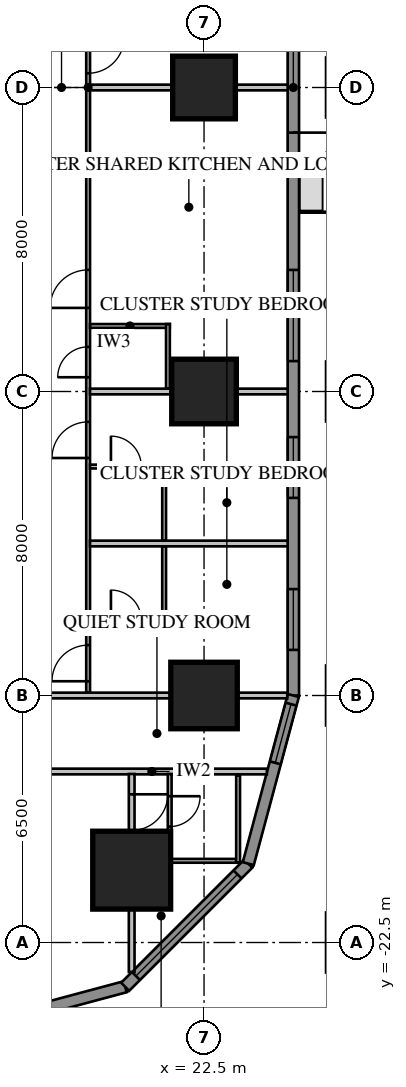
"""IFC4 building model, lengths in metres.
Left out: names, types, materials, properties, quantities, classifications, styles, units other than length and angle.
Written with IfcOpenShell. Run it as: python <this file> out.ifc"""

import sys

from ifc_helpers import new_model, si_unit, direction, frame, frame_2d, origin, origin_2d, place, context, subcontext, project, spatial, rectangle, extrude, element, fill, save


model = new_model("IFC4")
c1 = context("Model", 3, precision=1e-05, world=origin(), true_north=direction((0.0, 1.0)))
c2 = subcontext(c1, "Body", "Model", "MODEL_VIEW")
j1 = project(units=[si_unit("LENGTHUNIT", "METRE"), si_unit("PLANEANGLEUNIT", "RADIAN")], contexts=[c1])
p1 = place(None, origin())
s1 = spatial("IfcSite", under=j1, at=p1, CompositionType="ELEMENT")
p2 = place(p1, origin())
s2 = spatial("IfcBuilding", under=s1, at=p2, CompositionType="ELEMENT")
p3 = place(p2, frame((0.0, 0.0, 39.1)))
s3 = spatial("IfcBuildingStorey", under=s2, at=p3, CompositionType="ELEMENT", Elevation=39.1)
p4 = place(p3, frame((22.5, -16.0, 0.0), z_axis=(0.0, 0.0, 1.0), x_axis=(1.0, 0.0, 0.0)))
e1 = element("IfcColumn", 1, at=p4, inside=s3, PredefinedType="COLUMN", context=c2, shape_type="SweptSolid", body=[
    extrude(rectangle(XDim=1.75, YDim=1.75, at=origin_2d()), origin(), (0.0, 0.0, 1.0), 3.85),
])
p5 = place(p3, frame((22.5, -8.0, 0.0), z_axis=(0.0, 0.0, 1.0), x_axis=(1.0, 0.0, 0.0)))
e2 = element("IfcColumn", 2, at=p5, inside=s3, PredefinedType="COLUMN", context=c2, shape_type="SweptSolid", body=[
    extrude(rectangle(XDim=1.7, YDim=1.7, at=origin_2d()), origin(), (0.0, 0.0, 1.0), 3.85),
])
p6 = place(p3, frame((22.5, 0.0, 0.0), z_axis=(0.0, 0.0, 1.0), x_axis=(1.0, 0.0, 0.0)))
e3 = element("IfcColumn", 3, at=p6, inside=s3, PredefinedType="COLUMN", context=c2, shape_type="SweptSolid", body=[
    extrude(rectangle(XDim=1.65, YDim=1.65, at=origin_2d()), origin(), (0.0, 0.0, 1.0), 3.85),
])
p7 = place(p3, frame((20.596, -20.596, 0.0), z_axis=(0.0, 0.0, 1.0), x_axis=(1.0, 0.0, 0.0)))
e4 = element("IfcColumn", 4, at=p7, inside=s3, PredefinedType="COLUMN", context=c2, shape_type="SweptSolid", body=[
    extrude(rectangle(XDim=2.05, YDim=2.05, at=origin_2d()), origin(), (0.0, 0.0, 1.0), 3.85),
])
p8 = place(p3, frame((24.85, -16.0, 0.0), z_axis=(0.0, 0.0, 1.0), x_axis=(0.0, 1.0, 0.0)))
e5 = element("IfcWall", 5, at=p8, inside=s3, PredefinedType="SOLIDWALL", context=c2, shape_type="SweptSolid", body=[
    extrude(rectangle(XDim=32.0, YDim=0.3, at=frame_2d((16.0, 0.0))), origin(), (0.0, 0.0, 1.0), 3.65),
])
p9 = place(p8, frame((1.2, 0.0, 0.75)))
e6 = element("IfcOpeningElement", 6, at=p9, cuts=e5, PredefinedType="OPENING", context=c2, shape_type="SweptSolid", body=[
    extrude(rectangle(XDim=1.6, YDim=1.8, at=frame_2d((0.8, 0.9))), frame((0.0, 0.17, 0.0), z_axis=(0.0, -1.0, 0.0), x_axis=(1.0, 0.0, 0.0)), (0.0, 0.0, 1.0), 0.34),
])
p10 = place(p8, frame((5.2, 0.0, 0.75)))
e7 = element("IfcOpeningElement", 7, at=p10, cuts=e5, PredefinedType="OPENING", context=c2, shape_type="SweptSolid", body=[
    extrude(rectangle(XDim=1.6, YDim=1.8, at=frame_2d((0.8, 0.9))), frame((0.0, 0.17, 0.0), z_axis=(0.0, -1.0, 0.0), x_axis=(1.0, 0.0, 0.0)), (0.0, 0.0, 1.0), 0.34),
])
p11 = place(p8, frame((17.2, 0.0, 0.75)))
e8 = element("IfcOpeningElement", 8, at=p11, cuts=e5, PredefinedType="OPENING", context=c2, shape_type="SweptSolid", body=[
    extrude(rectangle(XDim=1.6, YDim=1.8, at=frame_2d((0.8, 0.9))), frame((0.0, 0.17, 0.0), z_axis=(0.0, -1.0, 0.0), x_axis=(1.0, 0.0, 0.0)), (0.0, 0.0, 1.0), 0.34),
])
p12 = place(p8, frame((21.2, 0.0, 0.75)))
e9 = element("IfcOpeningElement", 9, at=p12, cuts=e5, PredefinedType="OPENING", context=c2, shape_type="SweptSolid", body=[
    extrude(rectangle(XDim=1.6, YDim=1.8, at=frame_2d((0.8, 0.9))), frame((0.0, 0.17, 0.0), z_axis=(0.0, -1.0, 0.0), x_axis=(1.0, 0.0, 0.0)), (0.0, 0.0, 1.0), 0.34),
])
p13 = place(p8, frame((25.2, 0.0, 0.75)))
e10 = element("IfcOpeningElement", 10, at=p13, cuts=e5, PredefinedType="OPENING", context=c2, shape_type="SweptSolid", body=[
    extrude(rectangle(XDim=1.6, YDim=1.8, at=frame_2d((0.8, 0.9))), frame((0.0, 0.17, 0.0), z_axis=(0.0, -1.0, 0.0), x_axis=(1.0, 0.0, 0.0)), (0.0, 0.0, 1.0), 0.34),
])
p14 = place(p8, frame((29.2, 0.0, 0.75)))
e11 = element("IfcOpeningElement", 11, at=p14, cuts=e5, PredefinedType="OPENING", context=c2, shape_type="SweptSolid", body=[
    extrude(rectangle(XDim=1.6, YDim=1.8, at=frame_2d((0.8, 0.9))), frame((0.0, 0.17, 0.0), z_axis=(0.0, -1.0, 0.0), x_axis=(1.0, 0.0, 0.0)), (0.0, 0.0, 1.0), 0.34),
])
p15 = place(p8, frame((8.8, 0.0, 0.75)))
e12 = element("IfcOpeningElement", 12, at=p15, cuts=e5, PredefinedType="OPENING", context=c2, shape_type="SweptSolid", body=[
    extrude(rectangle(XDim=2.4, YDim=1.8, at=frame_2d((1.2, 0.9))), frame((0.0, 0.17, 0.0), z_axis=(0.0, -1.0, 0.0), x_axis=(1.0, 0.0, 0.0)), (0.0, 0.0, 1.0), 0.34),
])
p16 = place(p8, frame((13.812, 0.0, 0.0)))
e13 = element("IfcOpeningElement", 13, at=p16, cuts=e5, PredefinedType="OPENING", context=c2, shape_type="SweptSolid", body=[
    extrude(rectangle(XDim=1.0, YDim=2.4, at=frame_2d((0.5, 1.2))), frame((0.0, 0.17, 0.0), z_axis=(0.0, -1.0, 0.0), x_axis=(1.0, 0.0, 0.0)), (0.0, 0.0, 1.0), 0.34),
])
p17 = place(p3, frame((16.0, -24.85, 0.0), z_axis=(0.0, 0.0, 1.0), x_axis=(0.965920218567, 0.258839972501, 0.0)))
e14 = element("IfcWall", 14, at=p17, inside=s3, PredefinedType="SOLIDWALL", context=c2, shape_type="SweptSolid", body=[
    extrude(rectangle(XDim=4.581, YDim=0.3, at=frame_2d((2.291, 0.0))), origin(), (0.0, 0.0, 1.0), 3.65),
])
p18 = place(p3, frame((20.425, -23.664, 0.0), z_axis=(0.0, 0.0, 1.0), x_axis=(0.707106781187, 0.707106781187, 0.0)))
e15 = element("IfcWall", 15, at=p18, inside=s3, PredefinedType="SOLIDWALL", context=c2, shape_type="SweptSolid", body=[
    extrude(rectangle(XDim=4.581, YDim=0.3, at=frame_2d((2.291, 0.0))), origin(), (0.0, 0.0, 1.0), 3.65),
])
p19 = place(p18, frame((0.4, 0.0, 0.75)))
e16 = element("IfcOpeningElement", 16, at=p19, cuts=e15, PredefinedType="OPENING", context=c2, shape_type="SweptSolid", body=[
    extrude(rectangle(XDim=3.781, YDim=1.8, at=frame_2d((1.891, 0.9))), frame((0.0, 0.17, 0.0), z_axis=(0.0, -1.0, 0.0), x_axis=(1.0, 0.0, 0.0)), (0.0, 0.0, 1.0), 0.34),
])
p20 = place(p3, frame((23.664, -20.425, 0.0), z_axis=(0.0, 0.0, 1.0), x_axis=(0.258839972501, 0.965920218567, 0.0)))
e17 = element("IfcWall", 17, at=p20, inside=s3, PredefinedType="SOLIDWALL", context=c2, shape_type="SweptSolid", body=[
    extrude(rectangle(XDim=4.581, YDim=0.3, at=frame_2d((2.291, 0.0))), origin(), (0.0, 0.0, 1.0), 3.65),
])
p21 = place(p20, frame((2.746, 0.0, 0.75)))
e18 = element("IfcOpeningElement", 18, at=p21, cuts=e17, PredefinedType="OPENING", context=c2, shape_type="SweptSolid", body=[
    extrude(rectangle(XDim=1.6, YDim=1.8, at=frame_2d((0.8, 0.9))), frame((0.0, 0.17, 0.0), z_axis=(0.0, -1.0, 0.0), x_axis=(1.0, 0.0, 0.0)), (0.0, 0.0, 1.0), 0.34),
])
p22 = place(p3, frame((19.45, -15.925, 0.0), z_axis=(0.0, 0.0, 1.0), x_axis=(0.0, 1.0, 0.0)))
e19 = element("IfcWall", 19, at=p22, inside=s3, PredefinedType="PARTITIONING", context=c2, shape_type="SweptSolid", body=[
    extrude(rectangle(XDim=31.85, YDim=0.1, at=frame_2d((15.925, 0.0))), origin(), (0.0, 0.0, 1.0), 3.65),
])
p23 = place(p22, frame((10.125, 0.0, 0.0)))
e20 = element("IfcOpeningElement", 20, at=p23, cuts=e19, PredefinedType="OPENING", context=c2, shape_type="SweptSolid", body=[
    extrude(rectangle(XDim=1.0, YDim=2.1, at=frame_2d((0.5, 1.05))), frame((0.0, 0.07, 0.0), z_axis=(0.0, -1.0, 0.0), x_axis=(1.0, 0.0, 0.0)), (0.0, 0.0, 1.0), 0.14),
])
p24 = place(p22, frame((8.3, 0.0, 0.0)))
e21 = element("IfcOpeningElement", 21, at=p24, cuts=e19, PredefinedType="OPENING", context=c2, shape_type="SweptSolid", body=[
    extrude(rectangle(XDim=0.8, YDim=2.1, at=frame_2d((0.4, 1.05))), frame((0.0, 0.07, 0.0), z_axis=(0.0, -1.0, 0.0), x_axis=(1.0, 0.0, 0.0)), (0.0, 0.0, 1.0), 0.14),
])
p25 = place(p22, frame((0.3, 0.0, 0.0)))
e22 = element("IfcOpeningElement", 22, at=p25, cuts=e19, PredefinedType="OPENING", context=c2, shape_type="SweptSolid", body=[
    extrude(rectangle(XDim=0.95, YDim=2.1, at=frame_2d((0.475, 1.05))), frame((0.0, 0.07, 0.0), z_axis=(0.0, -1.0, 0.0), x_axis=(1.0, 0.0, 0.0)), (0.0, 0.0, 1.0), 0.14),
])
p26 = place(p22, frame((6.175, 0.0, 0.0)))
e23 = element("IfcOpeningElement", 23, at=p26, cuts=e19, PredefinedType="OPENING", context=c2, shape_type="SweptSolid", body=[
    extrude(rectangle(XDim=0.95, YDim=2.1, at=frame_2d((0.475, 1.05))), frame((0.0, 0.07, 0.0), z_axis=(0.0, -1.0, 0.0), x_axis=(1.0, 0.0, 0.0)), (0.0, 0.0, 1.0), 0.14),
])
p27 = place(p22, frame((16.3, 0.0, 0.0)))
e24 = element("IfcOpeningElement", 24, at=p27, cuts=e19, PredefinedType="OPENING", context=c2, shape_type="SweptSolid", body=[
    extrude(rectangle(XDim=0.95, YDim=2.1, at=frame_2d((0.475, 1.05))), frame((0.0, 0.07, 0.0), z_axis=(0.0, -1.0, 0.0), x_axis=(1.0, 0.0, 0.0)), (0.0, 0.0, 1.0), 0.14),
])
p28 = place(p22, frame((22.175, 0.0, 0.0)))
e25 = element("IfcOpeningElement", 25, at=p28, cuts=e19, PredefinedType="OPENING", context=c2, shape_type="SweptSolid", body=[
    extrude(rectangle(XDim=0.95, YDim=2.1, at=frame_2d((0.475, 1.05))), frame((0.0, 0.07, 0.0), z_axis=(0.0, -1.0, 0.0), x_axis=(1.0, 0.0, 0.0)), (0.0, 0.0, 1.0), 0.14),
])
p29 = place(p22, frame((24.3, 0.0, 0.0)))
e26 = element("IfcOpeningElement", 26, at=p29, cuts=e19, PredefinedType="OPENING", context=c2, shape_type="SweptSolid", body=[
    extrude(rectangle(XDim=0.95, YDim=2.1, at=frame_2d((0.475, 1.05))), frame((0.0, 0.07, 0.0), z_axis=(0.0, -1.0, 0.0), x_axis=(1.0, 0.0, 0.0)), (0.0, 0.0, 1.0), 0.14),
])
p30 = place(p22, frame((30.175, 0.0, 0.0)))
e27 = element("IfcOpeningElement", 27, at=p30, cuts=e19, PredefinedType="OPENING", context=c2, shape_type="SweptSolid", body=[
    extrude(rectangle(XDim=0.95, YDim=2.1, at=frame_2d((0.475, 1.05))), frame((0.0, 0.07, 0.0), z_axis=(0.0, -1.0, 0.0), x_axis=(1.0, 0.0, 0.0)), (0.0, 0.0, 1.0), 0.14),
])
p31 = place(p3, frame((19.5, -6.275, 0.0), z_axis=(0.0, 0.0, 1.0), x_axis=(1.0, 0.0, 0.0)))
e28 = element("IfcWall", 28, at=p31, inside=s3, PredefinedType="PARTITIONING", context=c2, shape_type="SweptSolid", body=[
    extrude(rectangle(XDim=2.1, YDim=0.1, at=frame_2d((1.05, 0.0))), origin(), (0.0, 0.0, 1.0), 3.65),
])
p32 = place(p3, frame((21.55, -7.925, 0.0), z_axis=(0.0, 0.0, 1.0), x_axis=(0.0, 1.0, 0.0)))
e29 = element("IfcWall", 29, at=p32, inside=s3, PredefinedType="PARTITIONING", context=c2, shape_type="SweptSolid", body=[
    extrude(rectangle(XDim=1.7, YDim=0.1, at=frame_2d((0.85, 0.0))), origin(), (0.0, 0.0, 1.0), 3.65),
])
p33 = place(p3, frame((18.1, -18.0, 0.0), z_axis=(0.0, 0.0, 1.0), x_axis=(1.0, 0.0, 0.0)))
e30 = element("IfcWall", 30, at=p33, inside=s3, PredefinedType="PARTITIONING", context=c2, shape_type="SweptSolid", body=[
    extrude(rectangle(XDim=6.053, YDim=0.15, at=frame_2d((3.027, 0.0))), origin(), (0.0, 0.0, 1.0), 3.65),
])
p34 = place(p3, frame((18.1, -16.0, 0.0), z_axis=(0.0, 0.0, 1.0), x_axis=(1.0, 0.0, 0.0)))
e31 = element("IfcWall", 31, at=p34, inside=s3, PredefinedType="PARTITIONING", context=c2, shape_type="SweptSolid", body=[
    extrude(rectangle(XDim=6.589, YDim=0.15, at=frame_2d((3.295, 0.0))), origin(), (0.0, 0.0, 1.0), 3.65),
])
for number, where, z_axis, x_axis in (
    (32, (19.5, -12.0, 0.0), (0.0, 0.0, 1.0), (1.0, 0.0, 0.0)),
    (33, (19.5, -8.0, 0.0), (0.0, 0.0, 1.0), (1.0, 0.0, 0.0)),
):
    element("IfcWall", number, at=place(p3, frame(where, z_axis=z_axis, x_axis=x_axis)), inside=s3, PredefinedType="PARTITIONING", context=c2, shape_type="SweptSolid", body=[
        extrude(rectangle(XDim=5.2, YDim=0.15, at=frame_2d((2.6, 0.0))), origin(), (0.0, 0.0, 1.0), 3.65),
    ])
p35 = place(p3, frame((19.5, 0.0, 0.0), z_axis=(0.0, 0.0, 1.0), x_axis=(1.0, 0.0, 0.0)))
e34 = element("IfcWall", 34, at=p35, inside=s3, PredefinedType="PARTITIONING", context=c2, shape_type="SweptSolid", body=[
    extrude(rectangle(XDim=5.2, YDim=0.15, at=frame_2d((2.6, 0.0))), origin(), (0.0, 0.0, 1.0), 2.957),
])
p36 = place(p3, frame((19.5, -14.025, 0.0), z_axis=(0.0, 0.0, 1.0), x_axis=(1.0, 0.0, 0.0)))
e35 = element("IfcWall", 35, at=p36, inside=s3, PredefinedType="PARTITIONING", context=c2, shape_type="SweptSolid", body=[
    extrude(rectangle(XDim=2.0, YDim=0.1, at=frame_2d((1.0, 0.0))), origin(), (0.0, 0.0, 1.0), 3.65),
])
p37 = place(p36, frame((0.55, 0.0, 0.0)))
e36 = element("IfcOpeningElement", 36, at=p37, cuts=e35, PredefinedType="OPENING", context=c2, shape_type="SweptSolid", body=[
    extrude(rectangle(XDim=0.8, YDim=2.1, at=frame_2d((0.4, 1.05))), frame((0.0, 0.07, 0.0), z_axis=(0.0, -1.0, 0.0), x_axis=(1.0, 0.0, 0.0)), (0.0, 0.0, 1.0), 0.14),
])
p38 = place(p3, frame((21.45, -13.975, 0.0), z_axis=(0.0, 0.0, 1.0), x_axis=(0.0, 1.0, 0.0)))
e37 = element("IfcWall", 37, at=p38, inside=s3, PredefinedType="PARTITIONING", context=c2, shape_type="SweptSolid", body=[
    extrude(rectangle(XDim=1.9, YDim=0.1, at=frame_2d((0.95, 0.0))), origin(), (0.0, 0.0, 1.0), 3.65),
])
p39 = place(p3, frame((19.5, -9.975, 0.0), z_axis=(0.0, 0.0, 1.0), x_axis=(1.0, 0.0, 0.0)))
e38 = element("IfcWall", 38, at=p39, inside=s3, PredefinedType="PARTITIONING", context=c2, shape_type="SweptSolid", body=[
    extrude(rectangle(XDim=2.0, YDim=0.1, at=frame_2d((1.0, 0.0))), origin(), (0.0, 0.0, 1.0), 3.65),
])
p40 = place(p39, frame((0.55, 0.0, 0.0)))
e39 = element("IfcOpeningElement", 39, at=p40, cuts=e38, PredefinedType="OPENING", context=c2, shape_type="SweptSolid", body=[
    extrude(rectangle(XDim=0.8, YDim=2.1, at=frame_2d((0.4, 1.05))), frame((0.0, 0.07, 0.0), z_axis=(0.0, -1.0, 0.0), x_axis=(1.0, 0.0, 0.0)), (0.0, 0.0, 1.0), 0.14),
])
p41 = place(p3, frame((21.45, -11.925, 0.0), z_axis=(0.0, 0.0, 1.0), x_axis=(0.0, 1.0, 0.0)))
e40 = element("IfcWall", 40, at=p41, inside=s3, PredefinedType="PARTITIONING", context=c2, shape_type="SweptSolid", body=[
    extrude(rectangle(XDim=1.9, YDim=0.1, at=frame_2d((0.95, 0.0))), origin(), (0.0, 0.0, 1.0), 3.65),
])
p42 = place(p3, frame((21.596, -18.065, 0.0), z_axis=(0.0, 0.0, 1.0), x_axis=(0.0, -1.0, 0.0)))
e41 = element("IfcWall", 41, at=p42, inside=s3, PredefinedType="PARTITIONING", context=c2, shape_type="SweptSolid", body=[
    extrude(rectangle(XDim=2.335, YDim=0.1, at=frame_2d((1.167, 0.0))), origin(), (0.0, 0.0, 1.0), 3.65),
])
p43 = place(p42, frame((0.585, 0.0, 0.0)))
e42 = element("IfcOpeningElement", 42, at=p43, cuts=e41, PredefinedType="OPENING", context=c2, shape_type="SweptSolid", body=[
    extrude(rectangle(XDim=0.8, YDim=2.1, at=frame_2d((0.4, 1.05))), frame((0.0, 0.07, 0.0), z_axis=(0.0, -1.0, 0.0), x_axis=(1.0, 0.0, 0.0)), (0.0, 0.0, 1.0), 0.14),
])
p44 = place(p3, frame((21.646, -20.35, 0.0), z_axis=(0.0, 0.0, 1.0), x_axis=(1.0, 0.0, 0.0)))
e43 = element("IfcWall", 43, at=p44, inside=s3, PredefinedType="PARTITIONING", context=c2, shape_type="SweptSolid", body=[
    extrude(rectangle(XDim=1.7, YDim=0.1, at=frame_2d((0.85, 0.0))), origin(), (0.0, 0.0, 1.0), 3.65),
])
p45 = place(p3, frame((23.396, -18.1, 0.0), z_axis=(0.0, 0.0, 1.0), x_axis=(0.0, -1.0, 0.0)))
e44 = element("IfcWall", 44, at=p45, inside=s3, PredefinedType="PARTITIONING", context=c2, shape_type="SweptSolid", body=[
    extrude(rectangle(XDim=2.3, YDim=0.1, at=frame_2d((1.15, 0.0))), origin(), (0.0, 0.0, 1.0), 3.65),
])
p46 = place(p3, frame((20.596, -18.065, 0.0), z_axis=(0.0, 0.0, 1.0), x_axis=(0.0, -1.0, 0.0)))
e45 = element("IfcWall", 45, at=p46, inside=s3, PredefinedType="PARTITIONING", context=c2, shape_type="SweptSolid", body=[
    extrude(rectangle(XDim=5.209, YDim=0.15, at=frame_2d((2.604, 0.0))), origin(), (0.0, 0.0, 1.0), 3.65),
])
p47 = place(p46, frame((0.535, 0.0, 0.0)))
e46 = element("IfcOpeningElement", 46, at=p47, cuts=e45, PredefinedType="OPENING", context=c2, shape_type="SweptSolid", body=[
    extrude(rectangle(XDim=0.95, YDim=2.1, at=frame_2d((0.475, 1.05))), frame((0.0, 0.095, 0.0), z_axis=(0.0, -1.0, 0.0), x_axis=(1.0, 0.0, 0.0)), (0.0, 0.0, 1.0), 0.19),
])
p48 = place(p21, origin())
e47 = element("IfcWindow", 47, at=p48, inside=s3, PartitioningType="SINGLE_PANEL", PredefinedType="WINDOW", context=c2, shape_type="SweptSolid", body=[
    extrude(rectangle(XDim=1.6, YDim=1.8, at=frame_2d((0.8, 0.9))), frame((0.0, 0.03, 0.0), z_axis=(0.0, -1.0, 0.0), x_axis=(1.0, 0.0, 0.0)), (0.0, 0.0, 1.0), 0.06),
])
fill(e18, e47)
p49 = place(p9, origin())
e48 = element("IfcWindow", 48, at=p49, inside=s3, PartitioningType="SINGLE_PANEL", PredefinedType="WINDOW", context=c2, shape_type="SweptSolid", body=[
    extrude(rectangle(XDim=1.6, YDim=1.8, at=frame_2d((0.8, 0.9))), frame((0.0, 0.03, 0.0), z_axis=(0.0, -1.0, 0.0), x_axis=(1.0, 0.0, 0.0)), (0.0, 0.0, 1.0), 0.06),
])
fill(e6, e48)
p50 = place(p10, origin())
e49 = element("IfcWindow", 49, at=p50, inside=s3, PartitioningType="SINGLE_PANEL", PredefinedType="WINDOW", context=c2, shape_type="SweptSolid", body=[
    extrude(rectangle(XDim=1.6, YDim=1.8, at=frame_2d((0.8, 0.9))), frame((0.0, 0.03, 0.0), z_axis=(0.0, -1.0, 0.0), x_axis=(1.0, 0.0, 0.0)), (0.0, 0.0, 1.0), 0.06),
])
fill(e7, e49)
p51 = place(p15, origin())
e50 = element("IfcWindow", 50, at=p51, inside=s3, PartitioningType="SINGLE_PANEL", PredefinedType="WINDOW", context=c2, shape_type="SweptSolid", body=[
    extrude(rectangle(XDim=2.4, YDim=1.8, at=frame_2d((1.2, 0.9))), frame((0.0, 0.03, 0.0), z_axis=(0.0, -1.0, 0.0), x_axis=(1.0, 0.0, 0.0)), (0.0, 0.0, 1.0), 0.06),
])
fill(e12, e50)
p52 = place(p19, origin())
e51 = element("IfcWindow", 51, at=p52, inside=s3, PartitioningType="SINGLE_PANEL", PredefinedType="WINDOW", context=c2, shape_type="SweptSolid", body=[
    extrude(rectangle(XDim=3.781, YDim=1.8, at=frame_2d((1.891, 0.9))), frame((0.0, 0.03, 0.0), z_axis=(0.0, -1.0, 0.0), x_axis=(1.0, 0.0, 0.0)), (0.0, 0.0, 1.0), 0.06),
])
fill(e16, e51)
p53 = place(p16, origin())
e52 = element("IfcDoor", 52, at=p53, inside=s3, OperationType="SINGLE_SWING_RIGHT", PredefinedType="DOOR", context=c2, shape_type="SweptSolid", body=[
    extrude(rectangle(XDim=1.0, YDim=2.4, at=frame_2d((0.5, 1.2))), frame((0.0, 0.025, 0.0), z_axis=(0.0, -1.0, 0.0), x_axis=(1.0, 0.0, 0.0)), (0.0, 0.0, 1.0), 0.05),
])
fill(e13, e52)
p54 = place(p23, origin())
e53 = element("IfcDoor", 53, at=p54, inside=s3, OperationType="SINGLE_SWING_LEFT", PredefinedType="DOOR", context=c2, shape_type="SweptSolid", body=[
    extrude(rectangle(XDim=1.0, YDim=2.1, at=frame_2d((0.5, 1.05))), frame((0.0, 0.025, 0.0), z_axis=(0.0, -1.0, 0.0), x_axis=(1.0, 0.0, 0.0)), (0.0, 0.0, 1.0), 0.05),
])
fill(e20, e53)
p55 = place(p24, origin())
e54 = element("IfcDoor", 54, at=p55, inside=s3, OperationType="SINGLE_SWING_LEFT", PredefinedType="DOOR", context=c2, shape_type="SweptSolid", body=[
    extrude(rectangle(XDim=0.8, YDim=2.1, at=frame_2d((0.4, 1.05))), frame((0.0, 0.025, 0.0), z_axis=(0.0, -1.0, 0.0), x_axis=(1.0, 0.0, 0.0)), (0.0, 0.0, 1.0), 0.05),
])
fill(e21, e54)
p56 = place(p25, origin())
e55 = element("IfcDoor", 55, at=p56, inside=s3, OperationType="SINGLE_SWING_LEFT", PredefinedType="DOOR", context=c2, shape_type="SweptSolid", body=[
    extrude(rectangle(XDim=0.95, YDim=2.1, at=frame_2d((0.475, 1.05))), frame((0.0, 0.025, 0.0), z_axis=(0.0, -1.0, 0.0), x_axis=(1.0, 0.0, 0.0)), (0.0, 0.0, 1.0), 0.05),
])
fill(e22, e55)
p57 = place(p37, origin())
e56 = element("IfcDoor", 56, at=p57, inside=s3, OperationType="SINGLE_SWING_LEFT", PredefinedType="DOOR", context=c2, shape_type="SweptSolid", body=[
    extrude(rectangle(XDim=0.8, YDim=2.1, at=frame_2d((0.4, 1.05))), frame((0.0, 0.025, 0.0), z_axis=(0.0, -1.0, 0.0), x_axis=(1.0, 0.0, 0.0)), (0.0, 0.0, 1.0), 0.05),
])
fill(e36, e56)
p58 = place(p26, origin())
e57 = element("IfcDoor", 57, at=p58, inside=s3, OperationType="SINGLE_SWING_LEFT", PredefinedType="DOOR", context=c2, shape_type="SweptSolid", body=[
    extrude(rectangle(XDim=0.95, YDim=2.1, at=frame_2d((0.475, 1.05))), frame((0.0, 0.025, 0.0), z_axis=(0.0, -1.0, 0.0), x_axis=(1.0, 0.0, 0.0)), (0.0, 0.0, 1.0), 0.05),
])
fill(e23, e57)
p59 = place(p40, origin())
e58 = element("IfcDoor", 58, at=p59, inside=s3, OperationType="SINGLE_SWING_LEFT", PredefinedType="DOOR", context=c2, shape_type="SweptSolid", body=[
    extrude(rectangle(XDim=0.8, YDim=2.1, at=frame_2d((0.4, 1.05))), frame((0.0, 0.025, 0.0), z_axis=(0.0, -1.0, 0.0), x_axis=(1.0, 0.0, 0.0)), (0.0, 0.0, 1.0), 0.05),
])
fill(e39, e58)
p60 = place(p27, origin())
e59 = element("IfcDoor", 59, at=p60, inside=s3, OperationType="SINGLE_SWING_RIGHT", PredefinedType="DOOR", context=c2, shape_type="SweptSolid", body=[
    extrude(rectangle(XDim=0.95, YDim=2.1, at=frame_2d((0.475, 1.05))), frame((0.0, 0.025, 0.0), z_axis=(0.0, -1.0, 0.0), x_axis=(1.0, 0.0, 0.0)), (0.0, 0.0, 1.0), 0.05),
])
fill(e24, e59)
p61 = place(p43, origin())
e60 = element("IfcDoor", 60, at=p61, inside=s3, OperationType="SINGLE_SWING_LEFT", PredefinedType="DOOR", context=c2, shape_type="SweptSolid", body=[
    extrude(rectangle(XDim=0.8, YDim=2.1, at=frame_2d((0.4, 1.05))), frame((0.0, 0.025, 0.0), z_axis=(0.0, -1.0, 0.0), x_axis=(1.0, 0.0, 0.0)), (0.0, 0.0, 1.0), 0.05),
])
fill(e42, e60)
p62 = place(p47, origin())
e61 = element("IfcDoor", 61, at=p62, inside=s3, OperationType="SINGLE_SWING_LEFT", PredefinedType="DOOR", context=c2, shape_type="SweptSolid", body=[
    extrude(rectangle(XDim=0.95, YDim=2.1, at=frame_2d((0.475, 1.05))), frame((0.0, 0.025, 0.0), z_axis=(0.0, -1.0, 0.0), x_axis=(1.0, 0.0, 0.0)), (0.0, 0.0, 1.0), 0.05),
])
fill(e46, e61)
save(model, sys.argv[1])
